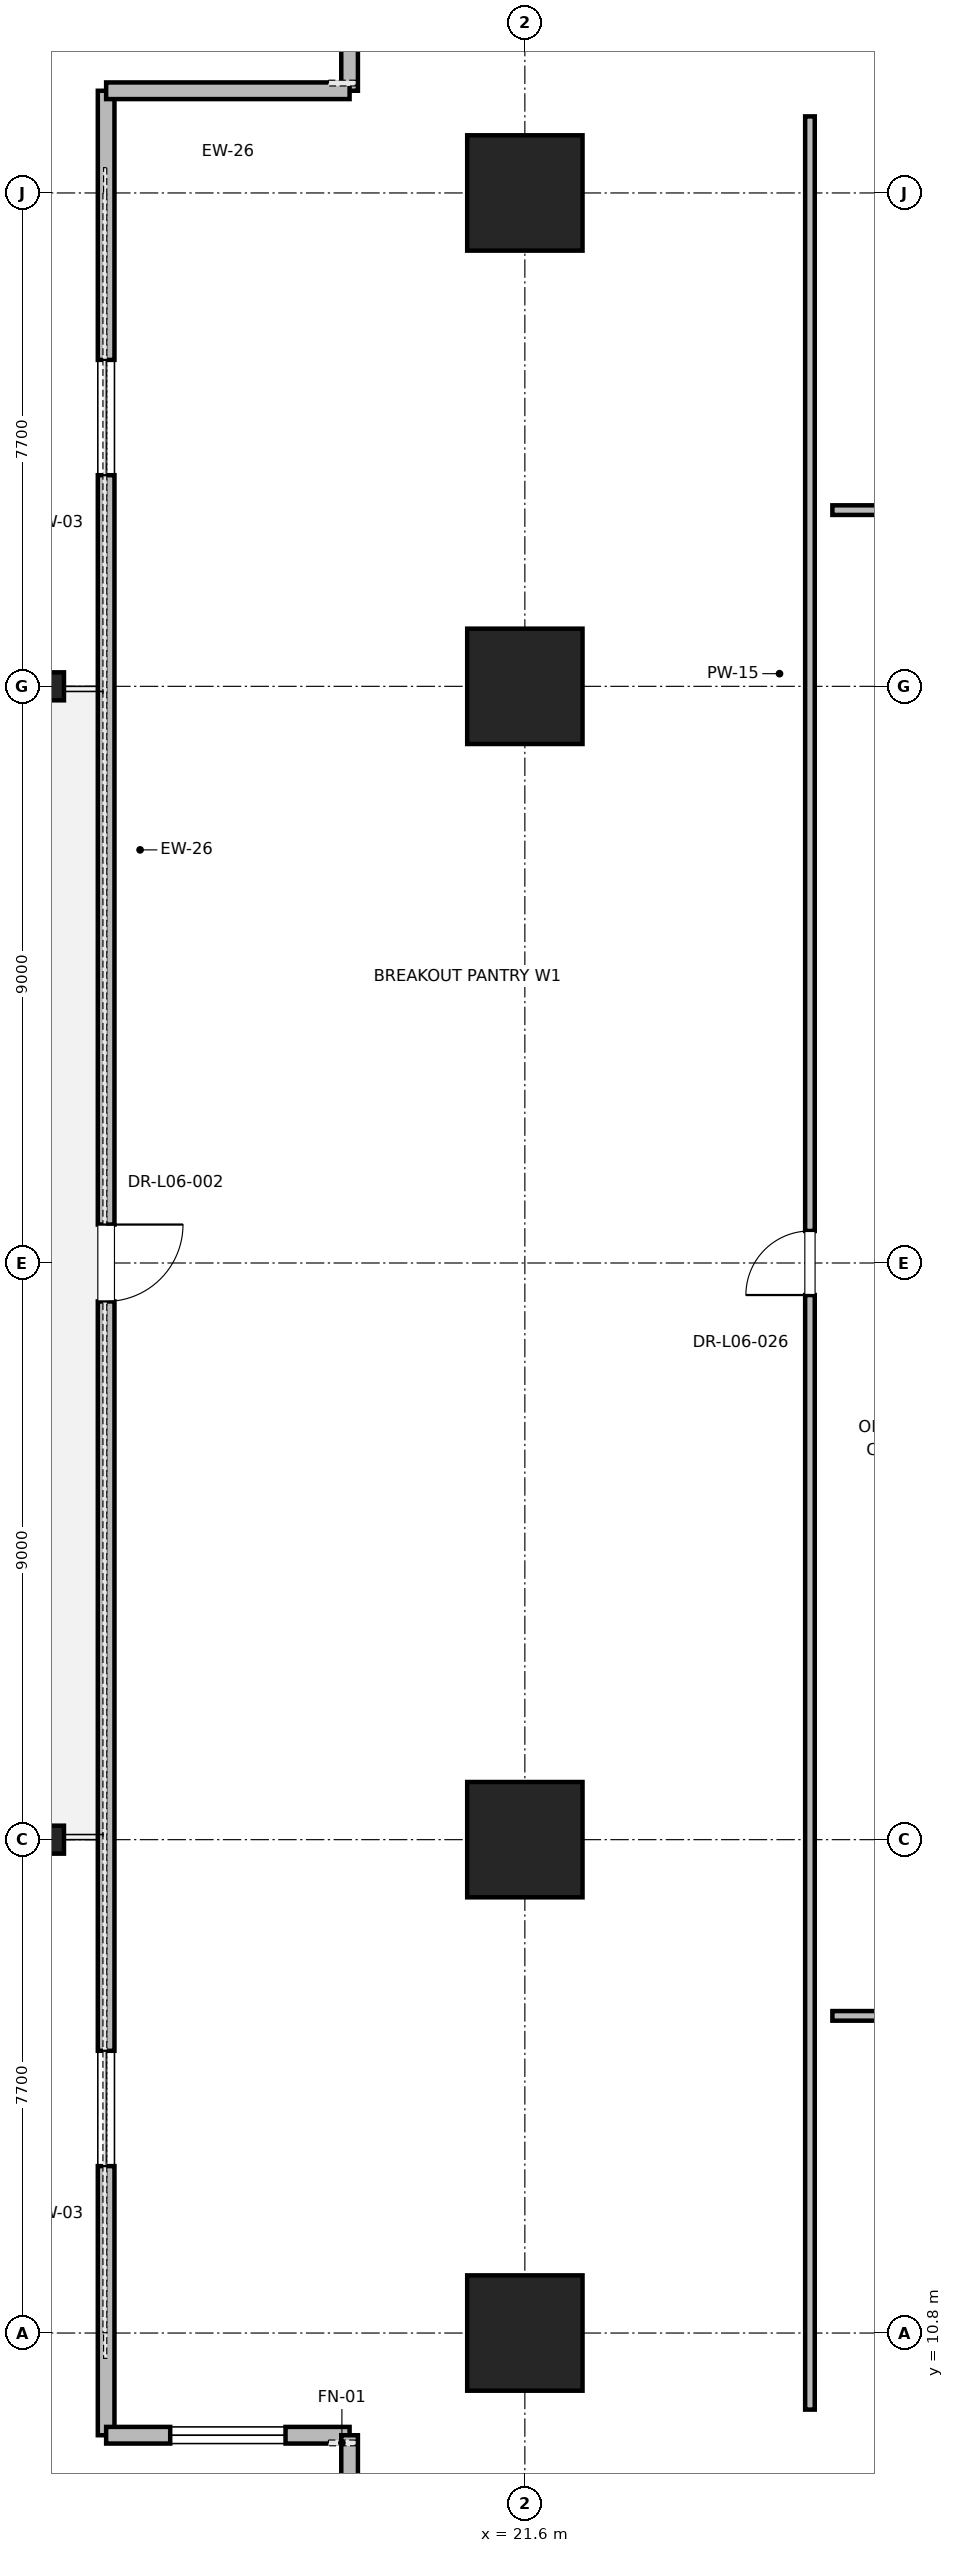
"""IFC4 building model, lengths in metres.
Left out: names, types, materials, properties, quantities, classifications, styles, units other than length and angle.
Written with IfcOpenShell. Run it as: python <this file> out.ifc"""

import sys

from ifc_helpers import new_model, si_unit, direction, frame, frame_2d, origin, origin_2d, place, context, subcontext, project, spatial, rectangle, i_section, extrude, element, fill, save


model = new_model("IFC4")
c1 = context("Model", 3, precision=1e-05, world=origin(), true_north=direction((0.0, 1.0)))
c2 = subcontext(c1, "Body", "Model", "MODEL_VIEW")
j1 = project(units=[si_unit("LENGTHUNIT", "METRE"), si_unit("PLANEANGLEUNIT", "RADIAN")], contexts=[c1])
p1 = place(None, origin())
s1 = spatial("IfcSite", under=j1, at=p1, CompositionType="ELEMENT")
p2 = place(p1, origin())
s2 = spatial("IfcBuilding", under=s1, at=p2, CompositionType="ELEMENT")
p3 = place(p2, frame((0.0, 0.0, 31.6)))
s3 = spatial("IfcBuildingStorey", under=s2, at=p3, CompositionType="ELEMENT", Elevation=31.6)
for number, where, z_axis, x_axis in (
    (1, (21.6, 18.5, 0.0), (0.0, 0.0, 1.0), (1.0, 0.0, 0.0)),
    (2, (21.6, 36.5, 0.0), (0.0, 0.0, 1.0), (1.0, 0.0, 0.0)),
    (3, (21.6, 10.8, 0.0), (0.0, 0.0, 1.0), (1.0, 0.0, 0.0)),
    (4, (21.6, 44.2, 0.0), (0.0, 0.0, 1.0), (1.0, 0.0, 0.0)),
):
    element("IfcColumn", number, at=place(p3, frame(where, z_axis=z_axis, x_axis=x_axis)), inside=s3, PredefinedType="COLUMN", context=c2, shape_type="SweptSolid", body=[
        extrude(rectangle(XDim=1.8, YDim=1.8, at=origin_2d()), origin(), (0.0, 0.0, 1.0), 4.0),
    ])
for number, where, z_axis, x_axis in (
    (5, (14.2, 18.5, 0.0), (0.0, 0.0, 1.0), (1.0, 0.0, 0.0)),
    (6, (14.2, 36.5, 0.0), (0.0, 0.0, 1.0), (1.0, 0.0, 0.0)),
):
    element("IfcColumn", number, at=place(p3, frame(where, z_axis=z_axis, x_axis=x_axis)), inside=s3, PredefinedType="COLUMN", context=c2, shape_type="SweptSolid", body=[
        extrude(i_section(OverallWidth=0.412, OverallDepth=0.437, WebThickness=0.036, FlangeThickness=0.058, FilletRadius=0.015, at=origin_2d()), origin(), (0.0, 0.0, 1.0), 4.0),
    ])
p4 = place(p3, frame((15.064, 45.795, 0.0), z_axis=(0.0, 0.0, 1.0), x_axis=(0.0, -1.0, 0.0)))
e7 = element("IfcWall", 7, at=p4, inside=s3, PredefinedType="PARAPET", context=c2, shape_type="SweptSolid", body=[
    extrude(rectangle(XDim=36.59, YDim=0.26, at=frame_2d((18.295, 0.0))), origin(), (0.0, 0.0, 1.0), 2.889),
])
p5 = place(p4, frame((4.2, 0.0, 0.85)))
e8 = element("IfcOpeningElement", 8, at=p5, cuts=e7, PredefinedType="OPENING", context=c2, shape_type="SweptSolid", body=[
    extrude(rectangle(XDim=1.8, YDim=2.2, at=frame_2d((0.9, 1.1))), frame((0.0, 0.13, 0.0), z_axis=(0.0, -1.0, 0.0), x_axis=(1.0, 0.0, 0.0)), (0.0, 0.0, 1.0), 0.26),
])
p6 = place(p4, frame((17.695, 0.0, 0.0)))
e9 = element("IfcOpeningElement", 9, at=p6, cuts=e7, PredefinedType="OPENING", context=c2, shape_type="SweptSolid", body=[
    extrude(rectangle(XDim=1.2, YDim=2.2, at=frame_2d((0.6, 1.1))), frame((0.0, 0.13, 0.0), z_axis=(0.0, -1.0, 0.0), x_axis=(1.0, 0.0, 0.0)), (0.0, 0.0, 1.0), 0.26),
])
p7 = place(p4, frame((30.59, 0.0, 0.85)))
e10 = element("IfcOpeningElement", 10, at=p7, cuts=e7, PredefinedType="OPENING", context=c2, shape_type="SweptSolid", body=[
    extrude(rectangle(XDim=1.8, YDim=2.2, at=frame_2d((0.9, 1.1))), frame((0.0, 0.13, 0.0), z_axis=(0.0, -1.0, 0.0), x_axis=(1.0, 0.0, 0.0)), (0.0, 0.0, 1.0), 0.26),
])
p8 = place(p3, frame((15.064, 9.205, 0.0), z_axis=(0.0, 0.0, 1.0), x_axis=(1.0, 0.0, 0.0)))
e11 = element("IfcWall", 11, at=p8, inside=s3, PredefinedType="PARAPET", context=c2, shape_type="SweptSolid", body=[
    extrude(rectangle(XDim=3.8, YDim=0.26, at=frame_2d((1.9, 0.0))), origin(), (0.0, 0.0, 1.0), 3.76),
])
p9 = place(p8, frame((1.0, 0.0, 0.85)))
e12 = element("IfcOpeningElement", 12, at=p9, cuts=e11, PredefinedType="OPENING", context=c2, shape_type="SweptSolid", body=[
    extrude(rectangle(XDim=1.8, YDim=2.2, at=frame_2d((0.9, 1.1))), frame((0.0, 0.13, 0.0), z_axis=(0.0, -1.0, 0.0), x_axis=(1.0, 0.0, 0.0)), (0.0, 0.0, 1.0), 0.26),
])
p10 = place(p3, frame((18.864, 9.205, 0.0), z_axis=(0.0, 0.0, 1.0), x_axis=(0.0, -1.0, 0.0)))
e13 = element("IfcWall", 13, at=p10, inside=s3, PredefinedType="PARAPET", context=c2, shape_type="SweptSolid", body=[
    extrude(rectangle(XDim=3.4, YDim=0.26, at=frame_2d((1.7, 0.0))), origin(), (0.0, 0.0, 1.0), 3.76),
])
p11 = place(p3, frame((18.864, 49.195, 0.0), z_axis=(0.0, 0.0, 1.0), x_axis=(0.0, -1.0, 0.0)))
e14 = element("IfcWall", 14, at=p11, inside=s3, PredefinedType="PARAPET", context=c2, shape_type="SweptSolid", body=[
    extrude(rectangle(XDim=3.4, YDim=0.26, at=frame_2d((1.7, 0.0))), origin(), (0.0, 0.0, 1.0), 3.76),
])
p12 = place(p11, frame((0.8, 0.0, 0.85)))
e15 = element("IfcOpeningElement", 15, at=p12, cuts=e14, PredefinedType="OPENING", context=c2, shape_type="SweptSolid", body=[
    extrude(rectangle(XDim=1.8, YDim=2.2, at=frame_2d((0.9, 1.1))), frame((0.0, 0.13, 0.0), z_axis=(0.0, -1.0, 0.0), x_axis=(1.0, 0.0, 0.0)), (0.0, 0.0, 1.0), 0.26),
])
p13 = place(p3, frame((18.864, 45.795, 0.0), z_axis=(0.0, 0.0, 1.0), x_axis=(-1.0, 0.0, 0.0)))
e16 = element("IfcWall", 16, at=p13, inside=s3, PredefinedType="PARAPET", context=c2, shape_type="SweptSolid", body=[
    extrude(rectangle(XDim=3.8, YDim=0.26, at=frame_2d((1.9, 0.0))), origin(), (0.0, 0.0, 1.0), 3.76),
])
p14 = place(p3, frame((26.4, 39.25, 0.0), z_axis=(0.0, 0.0, 1.0), x_axis=(1.0, 0.0, 0.0)))
e17 = element("IfcWall", 17, at=p14, inside=s3, PredefinedType="PARTITIONING", context=c2, shape_type="SweptSolid", body=[
    extrude(rectangle(XDim=12.512, YDim=0.15, at=frame_2d((6.256, 0.0))), origin(), (0.0, 0.0, 1.0), 2.85),
])
p15 = place(p14, frame((5.771, 0.0, 0.0)))
e18 = element("IfcOpeningElement", 18, at=p15, cuts=e17, PredefinedType="OPENING", context=c2, shape_type="SweptSolid", body=[
    extrude(rectangle(XDim=1.0, YDim=2.15, at=frame_2d((0.5, 1.075))), frame((0.0, 0.075, 0.0), z_axis=(0.0, -1.0, 0.0), x_axis=(1.0, 0.0, 0.0)), (0.0, 0.0, 1.0), 0.15),
])
p16 = place(p3, frame((26.4, 15.75, 0.0), z_axis=(0.0, 0.0, 1.0), x_axis=(1.0, 0.0, 0.0)))
e19 = element("IfcWall", 19, at=p16, inside=s3, PredefinedType="PARTITIONING", context=c2, shape_type="SweptSolid", body=[
    extrude(rectangle(XDim=8.704, YDim=0.15, at=frame_2d((4.352, 0.0))), origin(), (0.0, 0.0, 1.0), 2.85),
])
p17 = place(p16, frame((3.617, 0.0, 0.0)))
e20 = element("IfcOpeningElement", 20, at=p17, cuts=e19, PredefinedType="OPENING", context=c2, shape_type="SweptSolid", body=[
    extrude(rectangle(XDim=1.5, YDim=2.25, at=frame_2d((0.75, 1.125))), frame((0.0, 0.075, 0.0), z_axis=(0.0, -1.0, 0.0), x_axis=(1.0, 0.0, 0.0)), (0.0, 0.0, 1.0), 0.15),
])
p18 = place(p3, frame((26.05, 9.605, 0.0), z_axis=(0.0, 0.0, 1.0), x_axis=(0.0, 1.0, 0.0)))
e21 = element("IfcWall", 21, at=p18, inside=s3, PredefinedType="PARTITIONING", context=c2, shape_type="SweptSolid", body=[
    extrude(rectangle(XDim=35.79, YDim=0.15, at=frame_2d((17.895, 0.0))), origin(), (0.0, 0.0, 1.0), 2.85),
])
p19 = place(p18, frame((17.395, 0.0, 0.0)))
e22 = element("IfcOpeningElement", 22, at=p19, cuts=e21, PredefinedType="OPENING", context=c2, shape_type="SweptSolid", body=[
    extrude(rectangle(XDim=1.0, YDim=2.15, at=frame_2d((0.5, 1.075))), frame((0.0, 0.075, 0.0), z_axis=(0.0, -1.0, 0.0), x_axis=(1.0, 0.0, 0.0)), (0.0, 0.0, 1.0), 0.15),
])
p20 = place(p5, origin())
e23 = element("IfcWindow", 23, at=p20, inside=s3, PartitioningType="SINGLE_PANEL", PredefinedType="WINDOW", context=c2, shape_type="SweptSolid", body=[
    extrude(rectangle(XDim=1.8, YDim=2.2, at=frame_2d((0.9, 1.1))), frame((0.0, 0.03, 0.0), z_axis=(0.0, -1.0, 0.0), x_axis=(1.0, 0.0, 0.0)), (0.0, 0.0, 1.0), 0.06),
])
fill(e8, e23)
p21 = place(p6, origin())
e24 = element("IfcDoor", 24, at=p21, inside=s3, OperationType="SINGLE_SWING_LEFT", PredefinedType="DOOR", context=c2, shape_type="SweptSolid", body=[
    extrude(rectangle(XDim=1.2, YDim=2.2, at=frame_2d((0.6, 1.1))), frame((0.0, 0.025, 0.0), z_axis=(0.0, -1.0, 0.0), x_axis=(1.0, 0.0, 0.0)), (0.0, 0.0, 1.0), 0.05),
])
fill(e9, e24)
p22 = place(p7, origin())
e25 = element("IfcWindow", 25, at=p22, inside=s3, PartitioningType="SINGLE_PANEL", PredefinedType="WINDOW", context=c2, shape_type="SweptSolid", body=[
    extrude(rectangle(XDim=1.8, YDim=2.2, at=frame_2d((0.9, 1.1))), frame((0.0, 0.03, 0.0), z_axis=(0.0, -1.0, 0.0), x_axis=(1.0, 0.0, 0.0)), (0.0, 0.0, 1.0), 0.06),
])
fill(e10, e25)
p23 = place(p9, origin())
e26 = element("IfcWindow", 26, at=p23, inside=s3, PartitioningType="SINGLE_PANEL", PredefinedType="WINDOW", context=c2, shape_type="SweptSolid", body=[
    extrude(rectangle(XDim=1.8, YDim=2.2, at=frame_2d((0.9, 1.1))), frame((0.0, 0.03, 0.0), z_axis=(0.0, -1.0, 0.0), x_axis=(1.0, 0.0, 0.0)), (0.0, 0.0, 1.0), 0.06),
])
fill(e12, e26)
p24 = place(p19, origin())
e27 = element("IfcDoor", 27, at=p24, inside=s3, OperationType="SINGLE_SWING_LEFT", PredefinedType="DOOR", context=c2, shape_type="SweptSolid", body=[
    extrude(rectangle(XDim=1.0, YDim=2.15, at=frame_2d((0.5, 1.075))), frame((0.0, 0.025, 0.0), z_axis=(0.0, -1.0, 0.0), x_axis=(1.0, 0.0, 0.0)), (0.0, 0.0, 1.0), 0.05),
])
fill(e22, e27)
save(model, sys.argv[1])
